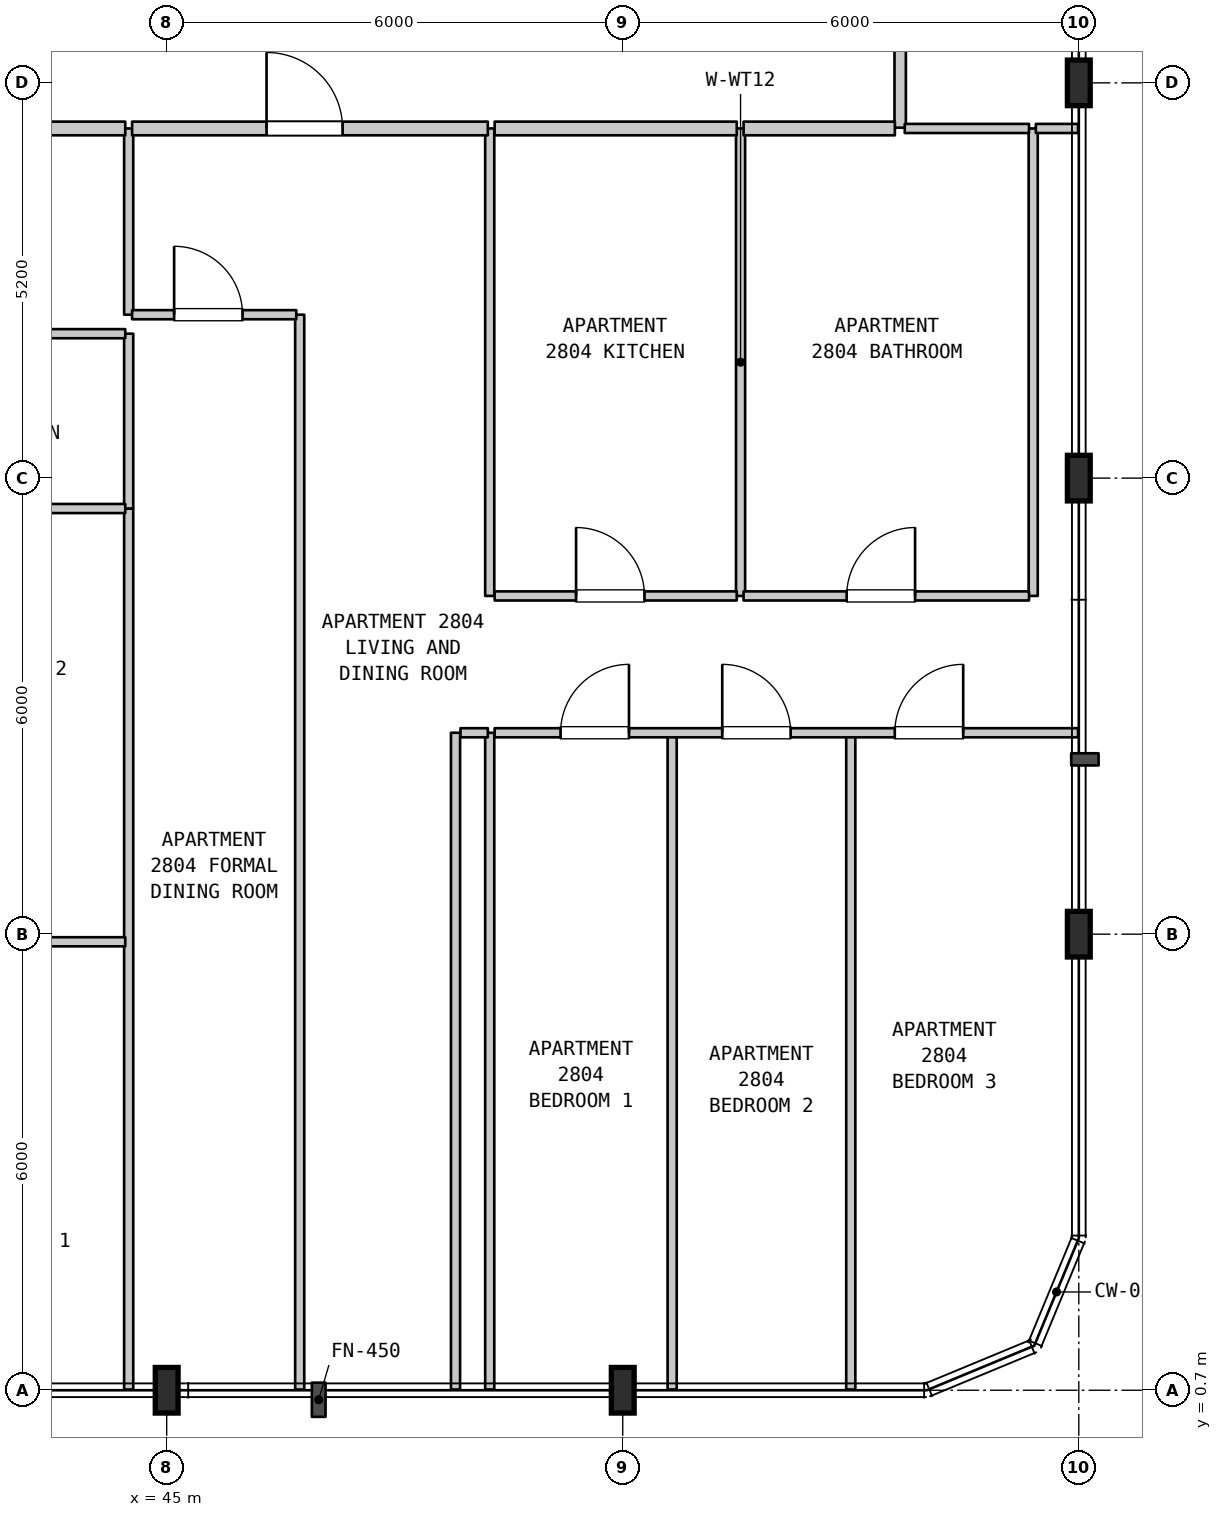
"""IFC4 building model, lengths in metres.
Left out: names, types, materials, properties, quantities, classifications, styles, units other than length and angle.
Written with IfcOpenShell. Run it as: python <this file> out.ifc"""

import sys

from ifc_helpers import new_model, si_unit, direction, frame, frame_2d, origin, origin_2d, place, context, subcontext, project, spatial, rectangle, i_section, extrude, element, fill, save


model = new_model("IFC4")
c1 = context("Model", 3, precision=1e-05, world=origin(), true_north=direction((0.0, 1.0)))
c2 = subcontext(c1, "Body", "Model", "MODEL_VIEW")
j1 = project(units=[si_unit("LENGTHUNIT", "METRE"), si_unit("PLANEANGLEUNIT", "RADIAN")], contexts=[c1])
p1 = place(None, origin())
s1 = spatial("IfcSite", under=j1, at=p1, CompositionType="ELEMENT")
p2 = place(p1, origin())
s2 = spatial("IfcBuilding", under=s1, at=p2, CompositionType="ELEMENT")
p3 = place(p2, frame((0.0, 0.0, 116.8)))
s3 = spatial("IfcBuildingStorey", under=s2, at=p3, CompositionType="ELEMENT", Elevation=116.8)
for number, where, z_axis, x_axis in (
    (1, (45.0, 0.7, 0.0), (0.0, 0.0, 1.0), (1.0, 0.0, 0.0)),
    (2, (51.0, 0.7, 0.0), (0.0, 0.0, 1.0), (1.0, 0.0, 0.0)),
    (3, (57.0, 6.7, 0.0), (0.0, 0.0, 1.0), (1.0, 0.0, 0.0)),
    (4, (57.0, 12.7, 0.0), (0.0, 0.0, 1.0), (1.0, 0.0, 0.0)),
    (5, (57.0, 17.9, 0.0), (0.0, 0.0, 1.0), (1.0, 0.0, 0.0)),
):
    element("IfcColumn", number, at=place(p3, frame(where, z_axis=z_axis, x_axis=x_axis)), inside=s3, PredefinedType="COLUMN", context=c2, shape_type="SweptSolid", body=[
        extrude(i_section(OverallWidth=0.3, OverallDepth=0.6, WebThickness=0.015, FlangeThickness=0.03, FilletRadius=0.027, at=origin_2d()), origin(), (0.0, 0.0, 1.0), 3.7),
    ])
p4 = place(p3, frame((44.5, 0.71, 0.0), z_axis=(0.0, 0.0, 1.0), x_axis=(0.0, 1.0, 0.0)))
e6 = element("IfcWall", 6, at=p4, inside=s3, PredefinedType="PARTITIONING", context=c2, shape_type="SweptSolid", body=[
    extrude(rectangle(XDim=11.59, YDim=0.12, at=frame_2d((5.795, 0.0))), origin(), (0.0, 0.0, 1.0), 3.38),
])
p5 = place(p3, frame((44.5, 12.3, 0.0), z_axis=(0.0, 0.0, 1.0), x_axis=(0.0, 1.0, 0.0)))
e7 = element("IfcWall", 7, at=p5, inside=s3, PredefinedType="PARTITIONING", context=c2, shape_type="SweptSolid", body=[
    extrude(rectangle(XDim=2.3, YDim=0.12, at=frame_2d((1.15, 0.0))), origin(), (0.0, 0.0, 1.0), 3.38),
])
p6 = place(p3, frame((44.5, 14.85, 0.0), z_axis=(0.0, 0.0, 1.0), x_axis=(0.0, 1.0, 0.0)))
e8 = element("IfcWall", 8, at=p6, inside=s3, PredefinedType="PARTITIONING", context=c2, shape_type="SweptSolid", body=[
    extrude(rectangle(XDim=2.45, YDim=0.12, at=frame_2d((1.225, 0.0))), origin(), (0.0, 0.0, 1.0), 3.38),
])
p7 = place(p3, frame((46.75, 0.71, 0.0), z_axis=(0.0, 0.0, 1.0), x_axis=(0.0, 1.0, 0.0)))
e9 = element("IfcWall", 9, at=p7, inside=s3, PredefinedType="PARTITIONING", context=c2, shape_type="SweptSolid", body=[
    extrude(rectangle(XDim=14.14, YDim=0.12, at=frame_2d((7.07, 0.0))), origin(), (0.0, 0.0, 1.0), 3.38),
])
for number, where, z_axis, x_axis in (
    (10, (48.8, 0.71, 0.0), (0.0, 0.0, 1.0), (0.0, 1.0, 0.0)),
    (11, (49.25, 0.71, 0.0), (0.0, 0.0, 1.0), (0.0, 1.0, 0.0)),
):
    element("IfcWall", number, at=place(p3, frame(where, z_axis=z_axis, x_axis=x_axis)), inside=s3, PredefinedType="PARTITIONING", context=c2, shape_type="SweptSolid", body=[
        extrude(rectangle(XDim=8.64, YDim=0.12, at=frame_2d((4.32, 0.0))), origin(), (0.0, 0.0, 1.0), 3.38),
    ])
p8 = place(p3, frame((49.25, 11.15, 0.0), z_axis=(0.0, 0.0, 1.0), x_axis=(0.0, 1.0, 0.0)))
e12 = element("IfcWall", 12, at=p8, inside=s3, PredefinedType="PARTITIONING", context=c2, shape_type="SweptSolid", body=[
    extrude(rectangle(XDim=6.15, YDim=0.12, at=frame_2d((3.075, 0.0))), origin(), (0.0, 0.0, 1.0), 3.38),
])
p9 = place(p3, frame((51.65, 0.71, 0.0), z_axis=(0.0, 0.0, 1.0), x_axis=(0.0, 1.0, 0.0)))
e13 = element("IfcWall", 13, at=p9, inside=s3, PredefinedType="PARTITIONING", context=c2, shape_type="SweptSolid", body=[
    extrude(rectangle(XDim=8.64, YDim=0.12, at=frame_2d((4.32, 0.0))), origin(), (0.0, 0.0, 1.0), 3.38),
])
p10 = place(p3, frame((52.55, 11.15, 0.0), z_axis=(0.0, 0.0, 1.0), x_axis=(0.0, 1.0, 0.0)))
e14 = element("IfcWall", 14, at=p10, inside=s3, PredefinedType="PARTITIONING", context=c2, shape_type="SweptSolid", body=[
    extrude(rectangle(XDim=6.15, YDim=0.12, at=frame_2d((3.075, 0.0))), origin(), (0.0, 0.0, 1.0), 3.38),
])
p11 = place(p3, frame((54.0, 0.71, 0.0), z_axis=(0.0, 0.0, 1.0), x_axis=(0.0, 1.0, 0.0)))
e15 = element("IfcWall", 15, at=p11, inside=s3, PredefinedType="PARTITIONING", context=c2, shape_type="SweptSolid", body=[
    extrude(rectangle(XDim=8.64, YDim=0.12, at=frame_2d((4.32, 0.0))), origin(), (0.0, 0.0, 1.0), 3.38),
])
p12 = place(p3, frame((54.65, 17.31, 0.0), z_axis=(0.0, 0.0, 1.0), x_axis=(0.0, 1.0, 0.0)))
e16 = element("IfcWall", 16, at=p12, inside=s3, PredefinedType="STANDARD", context=c2, shape_type="SweptSolid", body=[
    extrude(rectangle(XDim=2.19, YDim=0.15, at=frame_2d((1.095, 0.0))), origin(), (0.0, 0.0, 1.0), 3.38),
])
p13 = place(p3, frame((56.4, 11.15, 0.0), z_axis=(0.0, 0.0, 1.0), x_axis=(0.0, 1.0, 0.0)))
e17 = element("IfcWall", 17, at=p13, inside=s3, PredefinedType="PARTITIONING", context=c2, shape_type="SweptSolid", body=[
    extrude(rectangle(XDim=6.15, YDim=0.12, at=frame_2d((3.075, 0.0))), origin(), (0.0, 0.0, 1.0), 3.38),
])
p14 = place(p3, frame((40.295, 6.6, 0.0), z_axis=(0.0, 0.0, 1.0), x_axis=(1.0, 0.0, 0.0)))
e18 = element("IfcWall", 18, at=p14, inside=s3, PredefinedType="PARTITIONING", context=c2, shape_type="SweptSolid", body=[
    extrude(rectangle(XDim=4.16, YDim=0.12, at=frame_2d((2.08, 0.0))), origin(), (0.0, 0.0, 1.0), 2.78),
])
p15 = place(p3, frame((48.865, 9.35, 0.0), z_axis=(0.0, 0.0, 1.0), x_axis=(1.0, 0.0, 0.0)))
e19 = element("IfcWall", 19, at=p15, inside=s3, PredefinedType="PARTITIONING", context=c2, shape_type="SweptSolid", body=[
    extrude(rectangle(XDim=0.36, YDim=0.12, at=frame_2d((0.18, 0.0))), origin(), (0.0, 0.0, 1.0), 3.38),
])
p16 = place(p3, frame((49.315, 9.35, 0.0), z_axis=(0.0, 0.0, 1.0), x_axis=(1.0, 0.0, 0.0)))
e20 = element("IfcWall", 20, at=p16, inside=s3, PredefinedType="PARTITIONING", context=c2, shape_type="SweptSolid", body=[
    extrude(rectangle(XDim=7.675, YDim=0.12, at=frame_2d((3.837, 0.0))), origin(), (0.0, 0.0, 1.0), 3.38),
])
p17 = place(p16, frame((0.867, 0.0, 0.0)))
e21 = element("IfcOpeningElement", 21, at=p17, cuts=e20, PredefinedType="OPENING", context=c2, shape_type="SweptSolid", body=[
    extrude(rectangle(XDim=0.9, YDim=2.15, at=frame_2d((0.45, 1.075))), frame((0.0, 0.07, 0.0), z_axis=(0.0, -1.0, 0.0), x_axis=(1.0, 0.0, 0.0)), (0.0, 0.0, 1.0), 0.14),
])
p18 = place(p16, frame((2.994, 0.0, 0.0)))
e22 = element("IfcOpeningElement", 22, at=p18, cuts=e20, PredefinedType="OPENING", context=c2, shape_type="SweptSolid", body=[
    extrude(rectangle(XDim=0.9, YDim=2.15, at=frame_2d((0.45, 1.075))), frame((0.0, 0.07, 0.0), z_axis=(0.0, -1.0, 0.0), x_axis=(1.0, 0.0, 0.0)), (0.0, 0.0, 1.0), 0.14),
])
p19 = place(p16, frame((5.264, 0.0, 0.0)))
e23 = element("IfcOpeningElement", 23, at=p19, cuts=e20, PredefinedType="OPENING", context=c2, shape_type="SweptSolid", body=[
    extrude(rectangle(XDim=0.9, YDim=2.15, at=frame_2d((0.45, 1.075))), frame((0.0, 0.07, 0.0), z_axis=(0.0, -1.0, 0.0), x_axis=(1.0, 0.0, 0.0)), (0.0, 0.0, 1.0), 0.14),
])
p20 = place(p3, frame((49.315, 11.15, 0.0), z_axis=(0.0, 0.0, 1.0), x_axis=(1.0, 0.0, 0.0)))
e24 = element("IfcWall", 24, at=p20, inside=s3, PredefinedType="PARTITIONING", context=c2, shape_type="SweptSolid", body=[
    extrude(rectangle(XDim=3.185, YDim=0.12, at=frame_2d((1.593, 0.0))), origin(), (0.0, 0.0, 1.0), 3.38),
])
p21 = place(p20, frame((1.071, 0.0, 0.0)))
e25 = element("IfcOpeningElement", 25, at=p21, cuts=e24, PredefinedType="OPENING", context=c2, shape_type="SweptSolid", body=[
    extrude(rectangle(XDim=0.9, YDim=2.15, at=frame_2d((0.45, 1.075))), frame((0.0, 0.07, 0.0), z_axis=(0.0, -1.0, 0.0), x_axis=(1.0, 0.0, 0.0)), (0.0, 0.0, 1.0), 0.14),
])
p22 = place(p3, frame((52.59, 11.15, 0.0), z_axis=(0.0, 0.0, 1.0), x_axis=(1.0, 0.0, 0.0)))
e26 = element("IfcWall", 26, at=p22, inside=s3, PredefinedType="PARTITIONING", context=c2, shape_type="SweptSolid", body=[
    extrude(rectangle(XDim=3.755, YDim=0.12, at=frame_2d((1.877, 0.0))), origin(), (0.0, 0.0, 1.0), 3.38),
])
p23 = place(p22, frame((1.356, 0.0, 0.0)))
e27 = element("IfcOpeningElement", 27, at=p23, cuts=e26, PredefinedType="OPENING", context=c2, shape_type="SweptSolid", body=[
    extrude(rectangle(XDim=0.9, YDim=2.1, at=frame_2d((0.45, 1.05))), frame((0.0, 0.07, 0.0), z_axis=(0.0, -1.0, 0.0), x_axis=(1.0, 0.0, 0.0)), (0.0, 0.0, 1.0), 0.14),
])
for number, where, z_axis, x_axis in (
    (28, (40.295, 12.3, 0.0), (0.0, 0.0, 1.0), (1.0, 0.0, 0.0)),
    (29, (40.295, 14.6, 0.0), (0.0, 0.0, 1.0), (1.0, 0.0, 0.0)),
):
    element("IfcWall", number, at=place(p3, frame(where, z_axis=z_axis, x_axis=x_axis)), inside=s3, PredefinedType="PARTITIONING", context=c2, shape_type="SweptSolid", body=[
        extrude(rectangle(XDim=4.16, YDim=0.12, at=frame_2d((2.08, 0.0))), origin(), (0.0, 0.0, 1.0), 3.38),
    ])
p24 = place(p3, frame((44.545, 14.85, 0.0), z_axis=(0.0, 0.0, 1.0), x_axis=(1.0, 0.0, 0.0)))
e30 = element("IfcWall", 30, at=p24, inside=s3, PredefinedType="PARTITIONING", context=c2, shape_type="SweptSolid", body=[
    extrude(rectangle(XDim=2.16, YDim=0.12, at=frame_2d((1.08, 0.0))), origin(), (0.0, 0.0, 1.0), 3.38),
])
p25 = place(p24, frame((0.553, 0.0, 0.0)))
e31 = element("IfcOpeningElement", 31, at=p25, cuts=e30, PredefinedType="OPENING", context=c2, shape_type="SweptSolid", body=[
    extrude(rectangle(XDim=0.9, YDim=2.15, at=frame_2d((0.45, 1.075))), frame((0.0, 0.07, 0.0), z_axis=(0.0, -1.0, 0.0), x_axis=(1.0, 0.0, 0.0)), (0.0, 0.0, 1.0), 0.14),
])
p26 = place(p3, frame((40.295, 17.3, 0.0), z_axis=(0.0, 0.0, 1.0), x_axis=(1.0, 0.0, 0.0)))
e32 = element("IfcWall", 32, at=p26, inside=s3, PredefinedType="STANDARD", context=c2, shape_type="SweptSolid", body=[
    extrude(rectangle(XDim=4.16, YDim=0.18, at=frame_2d((2.08, 0.0))), origin(), (0.0, 0.0, 1.0), 3.38),
])
p27 = place(p3, frame((44.545, 17.3, 0.0), z_axis=(0.0, 0.0, 1.0), x_axis=(1.0, 0.0, 0.0)))
e33 = element("IfcWall", 33, at=p27, inside=s3, PredefinedType="STANDARD", context=c2, shape_type="SweptSolid", body=[
    extrude(rectangle(XDim=4.68, YDim=0.18, at=frame_2d((2.34, 0.0))), origin(), (0.0, 0.0, 1.0), 3.38),
])
p28 = place(p27, frame((1.769, 0.0, 0.0)))
e34 = element("IfcOpeningElement", 34, at=p28, cuts=e33, PredefinedType="OPENING", context=c2, shape_type="SweptSolid", body=[
    extrude(rectangle(XDim=1.0, YDim=2.15, at=frame_2d((0.5, 1.075))), frame((0.0, 0.1, 0.0), z_axis=(0.0, -1.0, 0.0), x_axis=(1.0, 0.0, 0.0)), (0.0, 0.0, 1.0), 0.2),
])
p29 = place(p3, frame((49.315, 17.3, 0.0), z_axis=(0.0, 0.0, 1.0), x_axis=(1.0, 0.0, 0.0)))
e35 = element("IfcWall", 35, at=p29, inside=s3, PredefinedType="STANDARD", context=c2, shape_type="SweptSolid", body=[
    extrude(rectangle(XDim=3.185, YDim=0.18, at=frame_2d((1.593, 0.0))), origin(), (0.0, 0.0, 1.0), 3.38),
])
p30 = place(p3, frame((52.59, 17.3, 0.0), z_axis=(0.0, 0.0, 1.0), x_axis=(1.0, 0.0, 0.0)))
e36 = element("IfcWall", 36, at=p30, inside=s3, PredefinedType="STANDARD", context=c2, shape_type="SweptSolid", body=[
    extrude(rectangle(XDim=1.99, YDim=0.18, at=frame_2d((0.995, 0.0))), origin(), (0.0, 0.0, 1.0), 3.38),
])
p31 = place(p3, frame((54.71, 17.3, 0.0), z_axis=(0.0, 0.0, 1.0), x_axis=(1.0, 0.0, 0.0)))
e37 = element("IfcWall", 37, at=p31, inside=s3, PredefinedType="PARTITIONING", context=c2, shape_type="SweptSolid", body=[
    extrude(rectangle(XDim=1.635, YDim=0.12, at=frame_2d((0.817, 0.0))), origin(), (0.0, 0.0, 1.0), 3.38),
])
p32 = place(p3, frame((56.435, 17.3, 0.0), z_axis=(0.0, 0.0, 1.0), x_axis=(1.0, 0.0, 0.0)))
e38 = element("IfcWall", 38, at=p32, inside=s3, PredefinedType="PARTITIONING", context=c2, shape_type="SweptSolid", body=[
    extrude(rectangle(XDim=0.555, YDim=0.12, at=frame_2d((0.277, 0.0))), origin(), (0.0, 0.0, 1.0), 3.38),
])
p33 = place(p17, origin())
e39 = element("IfcDoor", 39, at=p33, inside=s3, OperationType="SINGLE_SWING_RIGHT", PredefinedType="DOOR", context=c2, shape_type="SweptSolid", body=[
    extrude(rectangle(XDim=0.9, YDim=2.15, at=frame_2d((0.45, 1.075))), frame((0.0, 0.025, 0.0), z_axis=(0.0, -1.0, 0.0), x_axis=(1.0, 0.0, 0.0)), (0.0, 0.0, 1.0), 0.05),
])
fill(e21, e39)
p34 = place(p18, origin())
e40 = element("IfcDoor", 40, at=p34, inside=s3, OperationType="SINGLE_SWING_LEFT", PredefinedType="DOOR", context=c2, shape_type="SweptSolid", body=[
    extrude(rectangle(XDim=0.9, YDim=2.15, at=frame_2d((0.45, 1.075))), frame((0.0, 0.025, 0.0), z_axis=(0.0, -1.0, 0.0), x_axis=(1.0, 0.0, 0.0)), (0.0, 0.0, 1.0), 0.05),
])
fill(e22, e40)
p35 = place(p19, origin())
e41 = element("IfcDoor", 41, at=p35, inside=s3, OperationType="SINGLE_SWING_RIGHT", PredefinedType="DOOR", context=c2, shape_type="SweptSolid", body=[
    extrude(rectangle(XDim=0.9, YDim=2.15, at=frame_2d((0.45, 1.075))), frame((0.0, 0.025, 0.0), z_axis=(0.0, -1.0, 0.0), x_axis=(1.0, 0.0, 0.0)), (0.0, 0.0, 1.0), 0.05),
])
fill(e23, e41)
p36 = place(p21, origin())
e42 = element("IfcDoor", 42, at=p36, inside=s3, OperationType="SINGLE_SWING_LEFT", PredefinedType="DOOR", context=c2, shape_type="SweptSolid", body=[
    extrude(rectangle(XDim=0.9, YDim=2.15, at=frame_2d((0.45, 1.075))), frame((0.0, 0.025, 0.0), z_axis=(0.0, -1.0, 0.0), x_axis=(1.0, 0.0, 0.0)), (0.0, 0.0, 1.0), 0.05),
])
fill(e25, e42)
p37 = place(p23, origin())
e43 = element("IfcDoor", 43, at=p37, inside=s3, OperationType="SINGLE_SWING_RIGHT", PredefinedType="DOOR", context=c2, shape_type="SweptSolid", body=[
    extrude(rectangle(XDim=0.9, YDim=2.1, at=frame_2d((0.45, 1.05))), frame((0.0, 0.025, 0.0), z_axis=(0.0, -1.0, 0.0), x_axis=(1.0, 0.0, 0.0)), (0.0, 0.0, 1.0), 0.05),
])
fill(e27, e43)
p38 = place(p25, origin())
e44 = element("IfcDoor", 44, at=p38, inside=s3, OperationType="SINGLE_SWING_LEFT", PredefinedType="DOOR", context=c2, shape_type="SweptSolid", body=[
    extrude(rectangle(XDim=0.9, YDim=2.15, at=frame_2d((0.45, 1.075))), frame((0.0, 0.025, 0.0), z_axis=(0.0, -1.0, 0.0), x_axis=(1.0, 0.0, 0.0)), (0.0, 0.0, 1.0), 0.05),
])
fill(e31, e44)
p39 = place(p28, origin())
e45 = element("IfcDoor", 45, at=p39, inside=s3, OperationType="SINGLE_SWING_LEFT", PredefinedType="DOOR", context=c2, shape_type="SweptSolid", body=[
    extrude(rectangle(XDim=1.0, YDim=2.15, at=frame_2d((0.5, 1.075))), frame((0.0, 0.025, 0.0), z_axis=(0.0, -1.0, 0.0), x_axis=(1.0, 0.0, 0.0)), (0.0, 0.0, 1.0), 0.05),
])
fill(e34, e45)
save(model, sys.argv[1])
